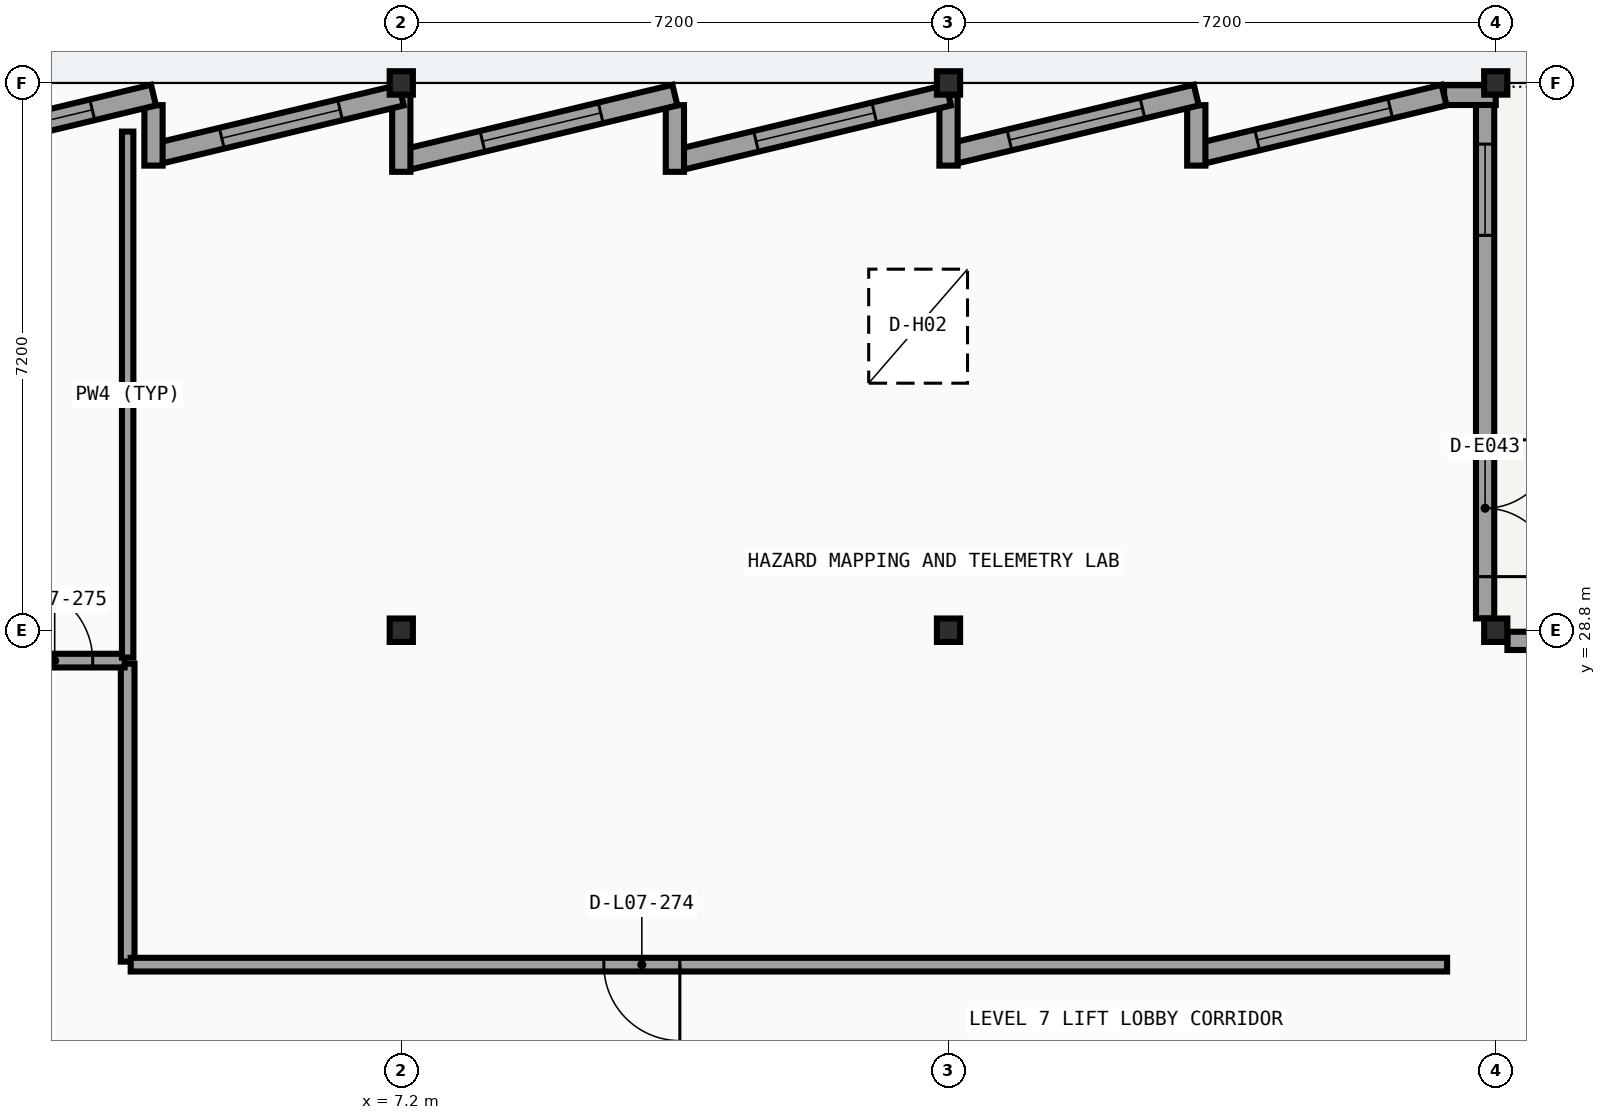
"""IFC4 building model, lengths in metres.
Left out: names, types, materials, properties, quantities, classifications, styles, units other than length and angle.
Written with IfcOpenShell. Run it as: python <this file> out.ifc"""

import sys

from ifc_helpers import new_model, si_unit, direction, frame, frame_2d, origin, origin_2d, place, context, subcontext, project, spatial, rectangle, i_section, extrude, element, fill, save


model = new_model("IFC4")
c1 = context("Model", 3, precision=1e-05, world=origin(), true_north=direction((0.0, 1.0)))
c2 = subcontext(c1, "Body", "Model", "MODEL_VIEW")
j1 = project(units=[si_unit("LENGTHUNIT", "METRE"), si_unit("PLANEANGLEUNIT", "RADIAN")], contexts=[c1])
p1 = place(None, origin())
s1 = spatial("IfcSite", under=j1, at=p1, CompositionType="ELEMENT")
p2 = place(p1, origin())
s2 = spatial("IfcBuilding", under=s1, at=p2, CompositionType="ELEMENT")
p3 = place(p2, frame((0.0, 0.0, 31.05)))
s3 = spatial("IfcBuildingStorey", under=s2, at=p3, CompositionType="ELEMENT", Elevation=31.05)
for number, where, z_axis, x_axis in (
    (1, (7.2, 28.8, 0.0), (0.0, 0.0, 1.0), (1.0, 0.0, 0.0)),
    (2, (7.2, 36.0, 0.0), (0.0, 0.0, 1.0), (1.0, 0.0, 0.0)),
    (3, (14.4, 28.8, 0.0), (0.0, 0.0, 1.0), (1.0, 0.0, 0.0)),
    (4, (14.4, 36.0, 0.0), (0.0, 0.0, 1.0), (1.0, 0.0, 0.0)),
    (5, (21.6, 28.8, 0.0), (0.0, 0.0, 1.0), (1.0, 0.0, 0.0)),
    (6, (21.6, 36.0, 0.0), (0.0, 0.0, 1.0), (1.0, 0.0, 0.0)),
):
    element("IfcColumn", number, at=place(p3, frame(where, z_axis=z_axis, x_axis=x_axis)), inside=s3, PredefinedType="COLUMN", context=c2, shape_type="SweptSolid", body=[
        extrude(i_section(OverallWidth=0.305, OverallDepth=0.308, WebThickness=0.01, FlangeThickness=0.015, FilletRadius=0.015, at=origin_2d()), origin(), (0.0, 0.0, 1.0), 4.2),
    ])
p4 = place(p3, frame((28.646, 28.66, 0.0), z_axis=(0.0, 0.0, 1.0), x_axis=(-1.0, 0.0, 0.0)))
e7 = element("IfcWall", 7, at=p4, inside=s3, PredefinedType="SOLIDWALL", context=c2, shape_type="SweptSolid", body=[
    extrude(rectangle(XDim=6.893, YDim=0.24, at=frame_2d((3.447, 0.0))), origin(), (0.0, 0.0, 1.0), 3.95),
])
p5 = place(p4, frame((0.55, 0.0, 0.0)))
e8 = element("IfcOpeningElement", 8, at=p5, cuts=e7, PredefinedType="OPENING", context=c2, shape_type="SweptSolid", body=[
    extrude(rectangle(XDim=1.8, YDim=2.15, at=frame_2d((0.9, 1.075))), frame((0.0, 0.13, 0.0), z_axis=(0.0, -1.0, 0.0), x_axis=(1.0, 0.0, 0.0)), (0.0, 0.0, 1.0), 0.26),
])
p6 = place(p4, frame((5.043, 0.0, 0.85)))
e9 = element("IfcOpeningElement", 9, at=p6, cuts=e7, PredefinedType="OPENING", context=c2, shape_type="SweptSolid", body=[
    extrude(rectangle(XDim=1.2, YDim=1.95, at=frame_2d((0.6, 0.975))), frame((0.0, 0.13, 0.0), z_axis=(0.0, -1.0, 0.0), x_axis=(1.0, 0.0, 0.0)), (0.0, 0.0, 1.0), 0.26),
])
p7 = place(p3, frame((21.46, 28.955, 0.0), z_axis=(0.0, 0.0, 1.0), x_axis=(0.0, 1.0, 0.0)))
e10 = element("IfcWall", 10, at=p7, inside=s3, PredefinedType="SOLIDWALL", context=c2, shape_type="SweptSolid", body=[
    extrude(rectangle(XDim=6.89, YDim=0.24, at=frame_2d((3.445, 0.0))), origin(), (0.0, 0.0, 1.0), 3.95),
])
p8 = place(p7, frame((0.55, 0.0, 0.0)))
e11 = element("IfcOpeningElement", 11, at=p8, cuts=e10, PredefinedType="OPENING", context=c2, shape_type="SweptSolid", body=[
    extrude(rectangle(XDim=1.8, YDim=2.15, at=frame_2d((0.9, 1.075))), frame((0.0, 0.13, 0.0), z_axis=(0.0, -1.0, 0.0), x_axis=(1.0, 0.0, 0.0)), (0.0, 0.0, 1.0), 0.26),
])
p9 = place(p7, frame((5.04, 0.0, 0.85)))
e12 = element("IfcOpeningElement", 12, at=p9, cuts=e10, PredefinedType="OPENING", context=c2, shape_type="SweptSolid", body=[
    extrude(rectangle(XDim=1.2, YDim=1.95, at=frame_2d((0.6, 0.975))), frame((0.0, 0.13, 0.0), z_axis=(0.0, -1.0, 0.0), x_axis=(1.0, 0.0, 0.0)), (0.0, 0.0, 1.0), 0.26),
])
p10 = place(p3, frame((21.6, 35.84, 0.0), z_axis=(0.0, 0.0, 1.0), x_axis=(-1.0, 0.0, 0.0)))
e13 = element("IfcWall", 13, at=p10, inside=s3, PredefinedType="SOLIDWALL", context=c2, shape_type="SweptSolid", body=[
    extrude(rectangle(XDim=0.68, YDim=0.26, at=frame_2d((0.34, 0.0))), origin(), (0.0, 0.0, 1.0), 3.95),
])
p11 = place(p3, frame((20.92, 35.84, 0.0), z_axis=(0.0, 0.0, 1.0), x_axis=(-0.972366208453, -0.233460824675, 0.0)))
e14 = element("IfcWall", 14, at=p11, inside=s3, PredefinedType="SOLIDWALL", context=c2, shape_type="SweptSolid", body=[
    extrude(rectangle(XDim=3.258, YDim=0.28, at=frame_2d((1.629, 0.0))), origin(), (0.0, 0.0, 1.0), 3.95),
])
p12 = place(p11, frame((0.729, 0.0, 0.8)))
e15 = element("IfcOpeningElement", 15, at=p12, cuts=e14, PredefinedType="OPENING", context=c2, shape_type="SweptSolid", body=[
    extrude(rectangle(XDim=1.8, YDim=1.85, at=frame_2d((0.9, 0.925))), frame((0.0, 0.15, 0.0), z_axis=(0.0, -1.0, 0.0), x_axis=(1.0, 0.0, 0.0)), (0.0, 0.0, 1.0), 0.3),
])
p13 = place(p3, frame((17.66, 34.912, 0.0), z_axis=(0.0, 0.0, 1.0), x_axis=(0.0, 1.0, 0.0)))
e16 = element("IfcWall", 16, at=p13, inside=s3, PredefinedType="SOLIDWALL", context=c2, shape_type="SweptSolid", body=[
    extrude(rectangle(XDim=0.796, YDim=0.24, at=frame_2d((0.398, 0.0))), origin(), (0.0, 0.0, 1.0), 3.95),
])
p14 = place(p3, frame((17.66, 35.84, 0.0), z_axis=(0.0, 0.0, 1.0), x_axis=(-0.972366208453, -0.233460824675, 0.0)))
e17 = element("IfcWall", 17, at=p14, inside=s3, PredefinedType="SOLIDWALL", context=c2, shape_type="SweptSolid", body=[
    extrude(rectangle(XDim=3.258, YDim=0.28, at=frame_2d((1.629, 0.0))), origin(), (0.0, 0.0, 1.0), 3.95),
])
p15 = place(p14, frame((0.729, 0.0, 0.8)))
e18 = element("IfcOpeningElement", 18, at=p15, cuts=e17, PredefinedType="OPENING", context=c2, shape_type="SweptSolid", body=[
    extrude(rectangle(XDim=1.8, YDim=1.85, at=frame_2d((0.9, 0.925))), frame((0.0, 0.15, 0.0), z_axis=(0.0, -1.0, 0.0), x_axis=(1.0, 0.0, 0.0)), (0.0, 0.0, 1.0), 0.3),
])
p16 = place(p3, frame((14.4, 34.912, 0.0), z_axis=(0.0, 0.0, 1.0), x_axis=(0.0, 1.0, 0.0)))
e19 = element("IfcWall", 19, at=p16, inside=s3, PredefinedType="SOLIDWALL", context=c2, shape_type="SweptSolid", body=[
    extrude(rectangle(XDim=0.932, YDim=0.24, at=frame_2d((0.466, 0.0))), origin(), (0.0, 0.0, 1.0), 3.95),
])
p17 = place(p3, frame((14.4, 35.84, 0.0), z_axis=(0.0, 0.0, 1.0), x_axis=(-0.972357805829, -0.233495818898, 0.0)))
e20 = element("IfcWall", 20, at=p17, inside=s3, PredefinedType="SOLIDWALL", context=c2, shape_type="SweptSolid", body=[
    extrude(rectangle(XDim=3.607, YDim=0.28, at=frame_2d((1.804, 0.0))), origin(), (0.0, 0.0, 1.0), 3.95),
])
p18 = place(p17, frame((1.004, 0.0, 0.8)))
e21 = element("IfcOpeningElement", 21, at=p18, cuts=e20, PredefinedType="OPENING", context=c2, shape_type="SweptSolid", body=[
    extrude(rectangle(XDim=1.6, YDim=1.75, at=frame_2d((0.8, 0.875))), frame((0.0, 0.15, 0.0), z_axis=(0.0, -1.0, 0.0), x_axis=(1.0, 0.0, 0.0)), (0.0, 0.0, 1.0), 0.3),
])
p19 = place(p3, frame((10.8, 34.831, 0.0), z_axis=(0.0, 0.0, 1.0), x_axis=(0.0, 1.0, 0.0)))
e22 = element("IfcWall", 22, at=p19, inside=s3, PredefinedType="SOLIDWALL", context=c2, shape_type="SweptSolid", body=[
    extrude(rectangle(XDim=0.877, YDim=0.24, at=frame_2d((0.438, 0.0))), origin(), (0.0, 0.0, 1.0), 3.95),
])
p20 = place(p3, frame((10.8, 35.84, 0.0), z_axis=(0.0, 0.0, 1.0), x_axis=(-0.972357805829, -0.233495818898, 0.0)))
e23 = element("IfcWall", 23, at=p20, inside=s3, PredefinedType="SOLIDWALL", context=c2, shape_type="SweptSolid", body=[
    extrude(rectangle(XDim=3.607, YDim=0.28, at=frame_2d((1.804, 0.0))), origin(), (0.0, 0.0, 1.0), 3.95),
])
p21 = place(p20, frame((1.004, 0.0, 0.8)))
e24 = element("IfcOpeningElement", 24, at=p21, cuts=e23, PredefinedType="OPENING", context=c2, shape_type="SweptSolid", body=[
    extrude(rectangle(XDim=1.6, YDim=1.75, at=frame_2d((0.8, 0.875))), frame((0.0, 0.15, 0.0), z_axis=(0.0, -1.0, 0.0), x_axis=(1.0, 0.0, 0.0)), (0.0, 0.0, 1.0), 0.3),
])
p22 = place(p3, frame((7.2, 34.831, 0.0), z_axis=(0.0, 0.0, 1.0), x_axis=(0.0, 1.0, 0.0)))
e25 = element("IfcWall", 25, at=p22, inside=s3, PredefinedType="SOLIDWALL", context=c2, shape_type="SweptSolid", body=[
    extrude(rectangle(XDim=1.013, YDim=0.24, at=frame_2d((0.507, 0.0))), origin(), (0.0, 0.0, 1.0), 3.95),
])
p23 = place(p3, frame((7.2, 35.84, 0.0), z_axis=(0.0, 0.0, 1.0), x_axis=(-0.972366208453, -0.233460824675, 0.0)))
e26 = element("IfcWall", 26, at=p23, inside=s3, PredefinedType="SOLIDWALL", context=c2, shape_type="SweptSolid", body=[
    extrude(rectangle(XDim=3.258, YDim=0.28, at=frame_2d((1.629, 0.0))), origin(), (0.0, 0.0, 1.0), 3.95),
])
p24 = place(p23, frame((0.829, 0.0, 0.8)))
e27 = element("IfcOpeningElement", 27, at=p24, cuts=e26, PredefinedType="OPENING", context=c2, shape_type="SweptSolid", body=[
    extrude(rectangle(XDim=1.6, YDim=1.75, at=frame_2d((0.8, 0.875))), frame((0.0, 0.15, 0.0), z_axis=(0.0, -1.0, 0.0), x_axis=(1.0, 0.0, 0.0)), (0.0, 0.0, 1.0), 0.3),
])
p25 = place(p3, frame((3.94, 34.912, 0.0), z_axis=(0.0, 0.0, 1.0), x_axis=(0.0, 1.0, 0.0)))
e28 = element("IfcWall", 28, at=p25, inside=s3, PredefinedType="SOLIDWALL", context=c2, shape_type="SweptSolid", body=[
    extrude(rectangle(XDim=0.796, YDim=0.24, at=frame_2d((0.398, 0.0))), origin(), (0.0, 0.0, 1.0), 3.95),
])
p26 = place(p3, frame((3.94, 35.84, 0.0), z_axis=(0.0, 0.0, 1.0), x_axis=(-0.972366208453, -0.233460824675, 0.0)))
e29 = element("IfcWall", 29, at=p26, inside=s3, PredefinedType="SOLIDWALL", context=c2, shape_type="SweptSolid", body=[
    extrude(rectangle(XDim=3.258, YDim=0.28, at=frame_2d((1.629, 0.0))), origin(), (0.0, 0.0, 1.0), 3.95),
])
p27 = place(p26, frame((0.829, 0.0, 0.8)))
e30 = element("IfcOpeningElement", 30, at=p27, cuts=e29, PredefinedType="OPENING", context=c2, shape_type="SweptSolid", body=[
    extrude(rectangle(XDim=1.6, YDim=1.75, at=frame_2d((0.8, 0.875))), frame((0.0, 0.15, 0.0), z_axis=(0.0, -1.0, 0.0), x_axis=(1.0, 0.0, 0.0)), (0.0, 0.0, 1.0), 0.3),
])
p28 = place(p3, frame((3.6, 24.44, 0.0), z_axis=(0.0, 0.0, 1.0), x_axis=(0.0, 1.0, 0.0)))
e31 = element("IfcWall", 31, at=p28, inside=s3, PredefinedType="PARTITIONING", context=c2, shape_type="SweptSolid", body=[
    extrude(rectangle(XDim=3.92, YDim=0.18, at=frame_2d((1.96, 0.0))), origin(), (0.0, 0.0, 1.0), 3.95),
])
p29 = place(p3, frame((1.64, 28.4, 0.0), z_axis=(0.0, 0.0, 1.0), x_axis=(1.0, 0.0, 0.0)))
e32 = element("IfcWall", 32, at=p29, inside=s3, PredefinedType="PARTITIONING", context=c2, shape_type="SweptSolid", body=[
    extrude(rectangle(XDim=1.92, YDim=0.18, at=frame_2d((0.96, 0.0))), origin(), (0.0, 0.0, 1.0), 3.95),
])
p30 = place(p29, frame((0.5, 0.0, 0.0)))
e33 = element("IfcOpeningElement", 33, at=p30, cuts=e32, PredefinedType="OPENING", context=c2, shape_type="SweptSolid", body=[
    extrude(rectangle(XDim=1.0, YDim=2.1, at=frame_2d((0.5, 1.05))), frame((0.0, 0.1, 0.0), z_axis=(0.0, -1.0, 0.0), x_axis=(1.0, 0.0, 0.0)), (0.0, 0.0, 1.0), 0.2),
])
p31 = place(p3, frame((3.64, 24.4, 0.0), z_axis=(0.0, 0.0, 1.0), x_axis=(1.0, 0.0, 0.0)))
e34 = element("IfcWall", 34, at=p31, inside=s3, PredefinedType="PARTITIONING", context=c2, shape_type="SweptSolid", body=[
    extrude(rectangle(XDim=17.32, YDim=0.18, at=frame_2d((8.66, 0.0))), origin(), (0.0, 0.0, 1.0), 3.95),
])
p32 = place(p31, frame((6.225, 0.0, 0.0)))
e35 = element("IfcOpeningElement", 35, at=p32, cuts=e34, PredefinedType="OPENING", context=c2, shape_type="SweptSolid", body=[
    extrude(rectangle(XDim=1.0, YDim=2.1, at=frame_2d((0.5, 1.05))), frame((0.0, 0.1, 0.0), z_axis=(0.0, -1.0, 0.0), x_axis=(1.0, 0.0, 0.0)), (0.0, 0.0, 1.0), 0.2),
])
p33 = place(p3, frame((3.6, 28.44, 0.0), z_axis=(0.0, 0.0, 1.0), x_axis=(0.0, 1.0, 0.0)))
e36 = element("IfcWall", 36, at=p33, inside=s3, PredefinedType="PARTITIONING", context=c2, shape_type="SweptSolid", body=[
    extrude(rectangle(XDim=6.92, YDim=0.15, at=frame_2d((3.46, 0.0))), origin(), (0.0, 0.0, 1.0), 3.95),
])
p34 = place(p8, frame((1.8, 0.0, 0.0), z_axis=(0.0, 0.0, 1.0), x_axis=(-1.0, 0.0, 0.0)))
e37 = element("IfcDoor", 37, at=p34, inside=s3, OperationType="DOUBLE_DOOR_SINGLE_SWING", PredefinedType="DOOR", context=c2, shape_type="SweptSolid", body=[
    extrude(rectangle(XDim=1.8, YDim=2.15, at=frame_2d((0.9, 1.075))), frame((0.0, 0.025, 0.0), z_axis=(0.0, -1.0, 0.0), x_axis=(1.0, 0.0, 0.0)), (0.0, 0.0, 1.0), 0.05),
])
fill(e11, e37)
p35 = place(p9, origin())
e38 = element("IfcWindow", 38, at=p35, inside=s3, PartitioningType="SINGLE_PANEL", PredefinedType="WINDOW", context=c2, shape_type="SweptSolid", body=[
    extrude(rectangle(XDim=1.2, YDim=1.95, at=frame_2d((0.6, 0.975))), frame((0.0, 0.03, 0.0), z_axis=(0.0, -1.0, 0.0), x_axis=(1.0, 0.0, 0.0)), (0.0, 0.0, 1.0), 0.06),
])
fill(e12, e38)
p36 = place(p12, origin())
e39 = element("IfcWindow", 39, at=p36, inside=s3, PartitioningType="SINGLE_PANEL", PredefinedType="WINDOW", context=c2, shape_type="SweptSolid", body=[
    extrude(rectangle(XDim=1.8, YDim=1.85, at=frame_2d((0.9, 0.925))), frame((0.0, 0.03, 0.0), z_axis=(0.0, -1.0, 0.0), x_axis=(1.0, 0.0, 0.0)), (0.0, 0.0, 1.0), 0.06),
])
fill(e15, e39)
p37 = place(p15, origin())
e40 = element("IfcWindow", 40, at=p37, inside=s3, PartitioningType="SINGLE_PANEL", PredefinedType="WINDOW", context=c2, shape_type="SweptSolid", body=[
    extrude(rectangle(XDim=1.8, YDim=1.85, at=frame_2d((0.9, 0.925))), frame((0.0, 0.03, 0.0), z_axis=(0.0, -1.0, 0.0), x_axis=(1.0, 0.0, 0.0)), (0.0, 0.0, 1.0), 0.06),
])
fill(e18, e40)
p38 = place(p18, origin())
e41 = element("IfcWindow", 41, at=p38, inside=s3, PartitioningType="SINGLE_PANEL", PredefinedType="WINDOW", context=c2, shape_type="SweptSolid", body=[
    extrude(rectangle(XDim=1.6, YDim=1.75, at=frame_2d((0.8, 0.875))), frame((0.0, 0.03, 0.0), z_axis=(0.0, -1.0, 0.0), x_axis=(1.0, 0.0, 0.0)), (0.0, 0.0, 1.0), 0.06),
])
fill(e21, e41)
p39 = place(p21, origin())
e42 = element("IfcWindow", 42, at=p39, inside=s3, PartitioningType="SINGLE_PANEL", PredefinedType="WINDOW", context=c2, shape_type="SweptSolid", body=[
    extrude(rectangle(XDim=1.6, YDim=1.75, at=frame_2d((0.8, 0.875))), frame((0.0, 0.03, 0.0), z_axis=(0.0, -1.0, 0.0), x_axis=(1.0, 0.0, 0.0)), (0.0, 0.0, 1.0), 0.06),
])
fill(e24, e42)
p40 = place(p24, origin())
e43 = element("IfcWindow", 43, at=p40, inside=s3, PartitioningType="SINGLE_PANEL", PredefinedType="WINDOW", context=c2, shape_type="SweptSolid", body=[
    extrude(rectangle(XDim=1.6, YDim=1.75, at=frame_2d((0.8, 0.875))), frame((0.0, 0.03, 0.0), z_axis=(0.0, -1.0, 0.0), x_axis=(1.0, 0.0, 0.0)), (0.0, 0.0, 1.0), 0.06),
])
fill(e27, e43)
p41 = place(p27, origin())
e44 = element("IfcWindow", 44, at=p41, inside=s3, PartitioningType="SINGLE_PANEL", PredefinedType="WINDOW", context=c2, shape_type="SweptSolid", body=[
    extrude(rectangle(XDim=1.6, YDim=1.75, at=frame_2d((0.8, 0.875))), frame((0.0, 0.03, 0.0), z_axis=(0.0, -1.0, 0.0), x_axis=(1.0, 0.0, 0.0)), (0.0, 0.0, 1.0), 0.06),
])
fill(e30, e44)
p42 = place(p3, frame((0.0, 0.0, -0.25)))
p43 = place(p42, frame((14.0, 32.8, 0.0)))
p44 = place(p43, frame((0.0, 0.0, 0.2)))
e45 = element("IfcDoor", 45, at=p44, inside=s3, OperationType="SINGLE_SWING_LEFT", PredefinedType="TRAPDOOR", context=c2, shape_type="SweptSolid", body=[
    extrude(rectangle(XDim=1.3, YDim=1.5, at=origin_2d()), origin(), (0.0, 0.0, 1.0), 0.05),
])
p45 = place(p32, origin())
e46 = element("IfcDoor", 46, at=p45, inside=s3, OperationType="SINGLE_SWING_RIGHT", PredefinedType="DOOR", context=c2, shape_type="SweptSolid", body=[
    extrude(rectangle(XDim=1.0, YDim=2.1, at=frame_2d((0.5, 1.05))), frame((0.0, 0.025, 0.0), z_axis=(0.0, -1.0, 0.0), x_axis=(1.0, 0.0, 0.0)), (0.0, 0.0, 1.0), 0.05),
])
fill(e35, e46)
p46 = place(p30, origin())
e47 = element("IfcDoor", 47, at=p46, inside=s3, OperationType="SINGLE_SWING_LEFT", PredefinedType="DOOR", context=c2, shape_type="SweptSolid", body=[
    extrude(rectangle(XDim=1.0, YDim=2.1, at=frame_2d((0.5, 1.05))), frame((0.0, 0.025, 0.0), z_axis=(0.0, -1.0, 0.0), x_axis=(1.0, 0.0, 0.0)), (0.0, 0.0, 1.0), 0.05),
])
fill(e33, e47)
save(model, sys.argv[1])
